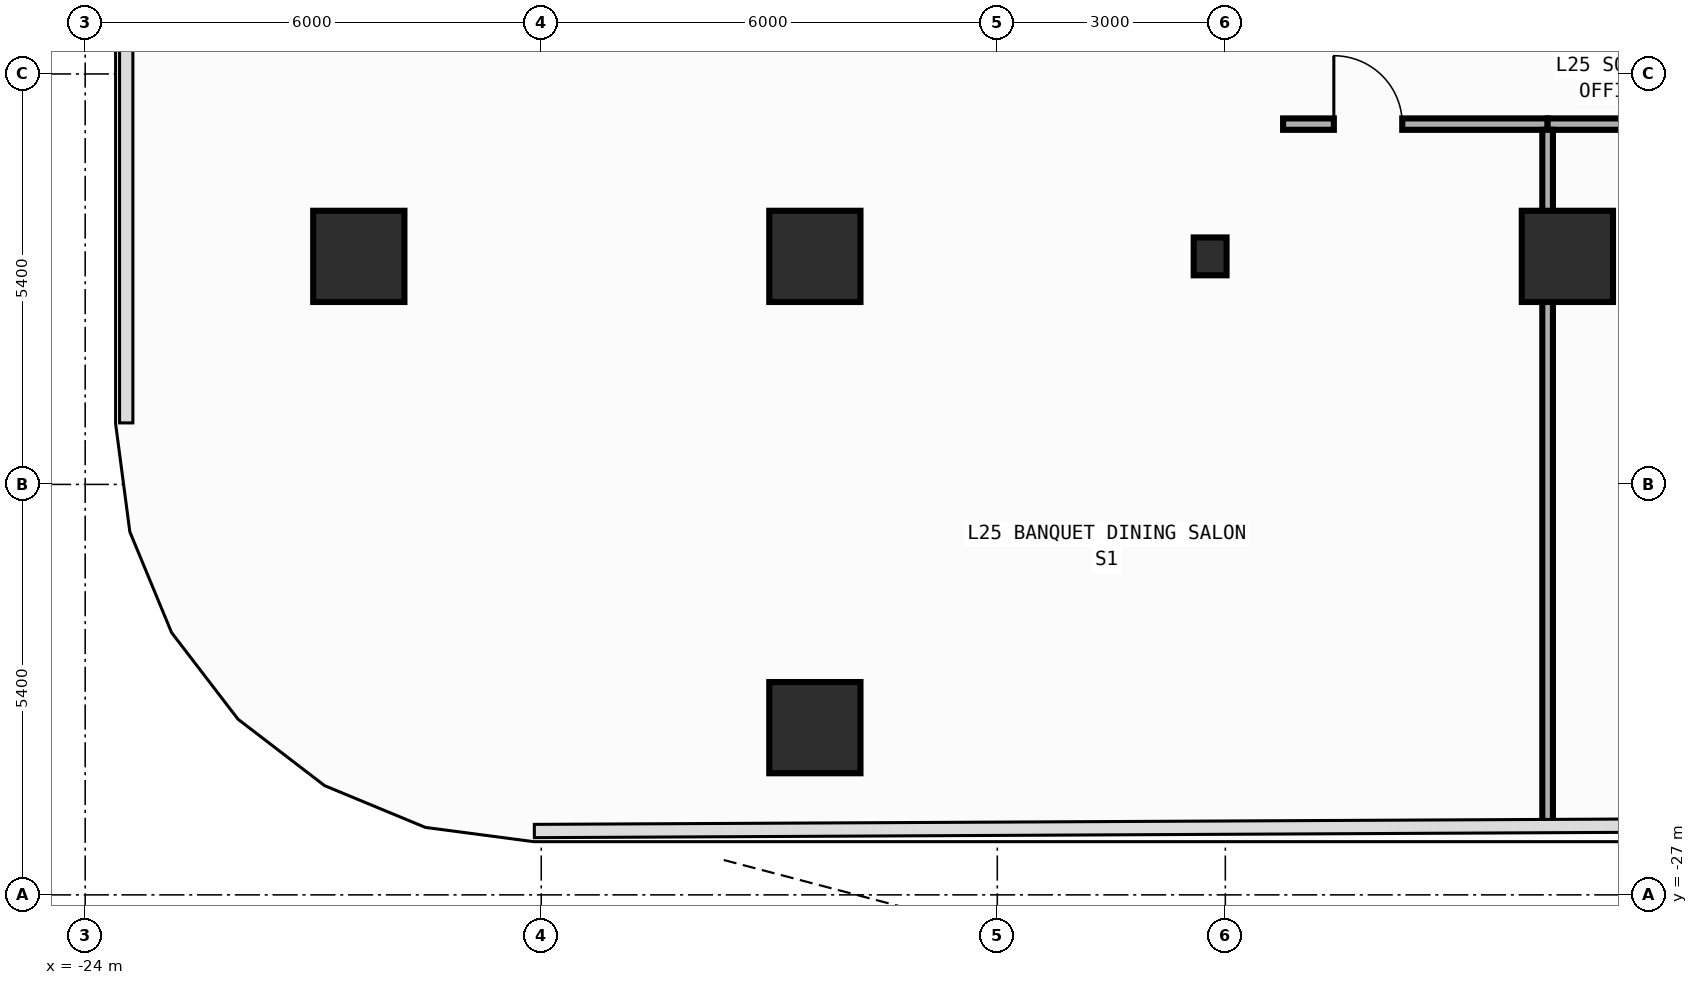
"""IFC4 building model, lengths in metres.
Left out: names, types, materials, properties, quantities, classifications, styles, units other than length and angle.
Written with IfcOpenShell. Run it as: python <this file> out.ifc"""

import sys

from ifc_helpers import new_model, si_unit, direction, frame, frame_2d, origin, origin_2d, place, context, subcontext, project, spatial, rectangle, i_section, extrude, element, fill, save


model = new_model("IFC4")
c1 = context("Model", 3, precision=1e-05, world=origin(), true_north=direction((0.0, 1.0)))
c2 = subcontext(c1, "Body", "Model", "MODEL_VIEW")
j1 = project(units=[si_unit("LENGTHUNIT", "METRE"), si_unit("PLANEANGLEUNIT", "RADIAN")], contexts=[c1])
p1 = place(None, origin())
s1 = spatial("IfcSite", under=j1, at=p1, CompositionType="ELEMENT")
p2 = place(p1, origin())
s2 = spatial("IfcBuilding", under=s1, at=p2, CompositionType="ELEMENT")
p3 = place(p2, frame((0.0, 0.0, 110.0)))
s3 = spatial("IfcBuildingStorey", under=s2, at=p3, CompositionType="ELEMENT", Elevation=110.0)
p4 = place(p3, frame((-9.2, -18.6, 0.0), z_axis=(0.0, 0.0, 1.0), x_axis=(1.0, 0.0, 0.0)))
e1 = element("IfcColumn", 1, at=p4, inside=s3, PredefinedType="COLUMN", context=c2, shape_type="SweptSolid", body=[
    extrude(i_section(OverallWidth=0.432, OverallDepth=0.498, WebThickness=0.045, FlangeThickness=0.07, FilletRadius=0.022, at=origin_2d()), origin(), (0.0, 0.0, 1.0), 4.2),
])
for number, where, z_axis, x_axis in (
    (2, (-20.4, -18.6, 0.0), (0.0, 0.0, 1.0), (1.0, 0.0, 0.0)),
    (3, (-14.4, -18.6, 0.0), (0.0, 0.0, 1.0), (1.0, 0.0, 0.0)),
    (4, (-4.5, -18.6, 0.0), (0.0, 0.0, 1.0), (1.0, 0.0, 0.0)),
    (5, (-14.4, -24.8, 0.0), (0.0, 0.0, 1.0), (1.0, 0.0, 0.0)),
):
    element("IfcColumn", number, at=place(p3, frame(where, z_axis=z_axis, x_axis=x_axis)), inside=s3, PredefinedType="COLUMN", context=c2, shape_type="SweptSolid", body=[
        extrude(rectangle(XDim=1.2, YDim=1.2, at=origin_2d()), origin(), (0.0, 0.0, 1.0), 4.2),
    ])
p5 = place(p3, frame((-8.24, -16.86, 0.0), z_axis=(0.0, 0.0, 1.0), x_axis=(1.0, 0.0, 0.0)))
e6 = element("IfcWall", 6, at=p5, inside=s3, PredefinedType="PARTITIONING", context=c2, shape_type="SweptSolid", body=[
    extrude(rectangle(XDim=3.48, YDim=0.15, at=frame_2d((1.74, 0.0))), origin(), (0.0, 0.0, 1.0), 3.94),
])
p6 = place(p5, frame((0.667, 0.0, 0.0)))
e7 = element("IfcOpeningElement", 7, at=p6, cuts=e6, PredefinedType="OPENING", context=c2, shape_type="SweptSolid", body=[
    extrude(rectangle(XDim=0.9, YDim=2.15, at=frame_2d((0.45, 1.075))), frame((0.0, 0.085, 0.0), z_axis=(0.0, -1.0, 0.0), x_axis=(1.0, 0.0, 0.0)), (0.0, 0.0, 1.0), 0.17),
])
p7 = place(p3, frame((-4.76, -16.86, 0.0), z_axis=(0.0, 0.0, 1.0), x_axis=(1.0, 0.0, 0.0)))
e8 = element("IfcWall", 8, at=p7, inside=s3, PredefinedType="PARTITIONING", context=c2, shape_type="SweptSolid", body=[
    extrude(rectangle(XDim=13.0, YDim=0.15, at=frame_2d((6.5, 0.0))), origin(), (0.0, 0.0, 1.0), 3.94),
])
p8 = place(p7, frame((11.437, 0.0, 0.0)))
e9 = element("IfcOpeningElement", 9, at=p8, cuts=e8, PredefinedType="OPENING", context=c2, shape_type="SweptSolid", body=[
    extrude(rectangle(XDim=0.9, YDim=2.15, at=frame_2d((0.45, 1.075))), frame((0.0, 0.085, 0.0), z_axis=(0.0, -1.0, 0.0), x_axis=(1.0, 0.0, 0.0)), (0.0, 0.0, 1.0), 0.17),
])
p9 = place(p3, frame((-4.76, -26.09, 0.0), z_axis=(0.0, 0.0, 1.0), x_axis=(0.0, 1.0, 0.0)))
e10 = element("IfcWall", 10, at=p9, inside=s3, PredefinedType="PARTITIONING", context=c2, shape_type="SweptSolid", body=[
    extrude(rectangle(XDim=9.155, YDim=0.14, at=frame_2d((4.577, 0.0))), origin(), (0.0, 0.0, 1.0), 3.49),
])
p10 = place(p6, origin())
e11 = element("IfcDoor", 11, at=p10, inside=s3, OperationType="SINGLE_SWING_LEFT", PredefinedType="DOOR", context=c2, shape_type="SweptSolid", body=[
    extrude(rectangle(XDim=0.9, YDim=2.15, at=frame_2d((0.45, 1.075))), frame((0.0, 0.025, 0.0), z_axis=(0.0, -1.0, 0.0), x_axis=(1.0, 0.0, 0.0)), (0.0, 0.0, 1.0), 0.05),
])
fill(e7, e11)
save(model, sys.argv[1])
